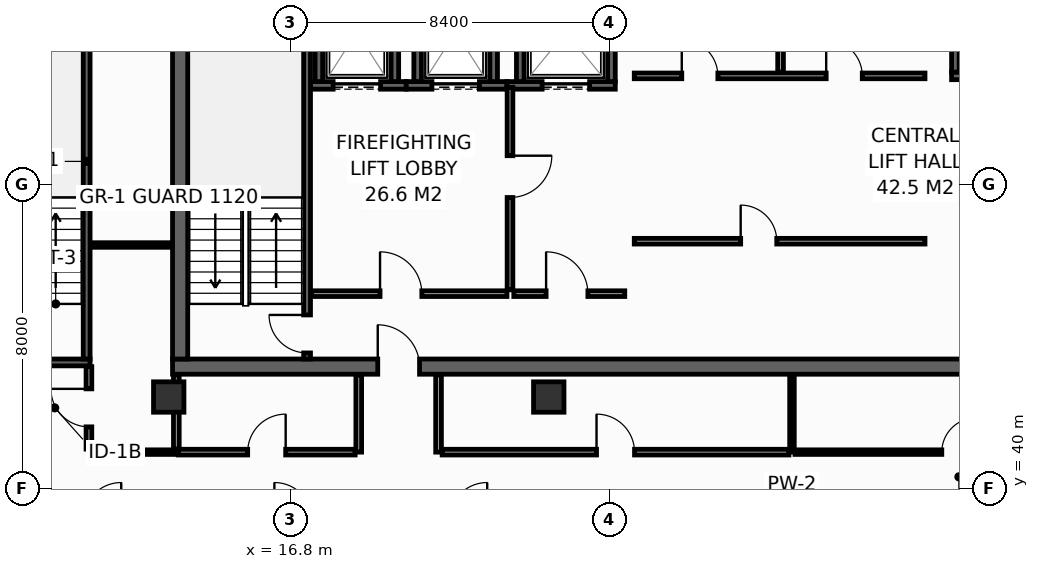
"""IFC4 building model, lengths in metres.
Left out: names, types, materials, properties, quantities, classifications, styles, units other than length and angle.
Written with IfcOpenShell. Run it as: python <this file> out.ifc"""

import sys

from ifc_helpers import new_model, si_unit, direction, frame, frame_2d, origin, origin_2d, place, context, subcontext, project, spatial, rectangle, hollow_rectangle, extrude, element, fill, save


model = new_model("IFC4")
c1 = context("Model", 3, precision=1e-05, world=origin(), true_north=direction((0.0, 1.0)))
c2 = subcontext(c1, "Body", "Model", "MODEL_VIEW")
j1 = project(units=[si_unit("LENGTHUNIT", "METRE"), si_unit("PLANEANGLEUNIT", "RADIAN")], contexts=[c1])
p1 = place(None, origin())
s1 = spatial("IfcSite", under=j1, at=p1, CompositionType="ELEMENT")
p2 = place(p1, origin())
s2 = spatial("IfcBuilding", under=s1, at=p2, CompositionType="ELEMENT")
p3 = place(p2, frame((0.0, 0.0, 230.6)))
s3 = spatial("IfcBuildingStorey", under=s2, at=p3, CompositionType="ELEMENT", Elevation=230.6)
p4 = place(p3, frame((13.7, 43.2, 0.0), z_axis=(0.0, 0.0, 1.0), x_axis=(1.0, 0.0, 0.0)))
e1 = element("IfcWall", 1, at=p4, inside=s3, PredefinedType="SHEAR", context=c2, shape_type="SweptSolid", body=[
    extrude(rectangle(XDim=32.5, YDim=0.4, at=frame_2d((16.25, 0.0))), origin(), (0.0, 0.0, 1.0), 3.55),
])
p5 = place(p4, frame((5.4, 0.0, 0.0)))
e2 = element("IfcOpeningElement", 2, at=p5, cuts=e1, PredefinedType="OPENING", context=c2, shape_type="SweptSolid", body=[
    extrude(rectangle(XDim=1.1, YDim=2.15, at=frame_2d((0.55, 1.075))), frame((0.0, 0.21, 0.0), z_axis=(0.0, -1.0, 0.0), x_axis=(1.0, 0.0, 0.0)), (0.0, 0.0, 1.0), 0.42),
])
p6 = place(p4, frame((25.6, 0.0, 0.0)))
e3 = element("IfcOpeningElement", 3, at=p6, cuts=e1, PredefinedType="OPENING", context=c2, shape_type="SweptSolid", body=[
    extrude(rectangle(XDim=1.1, YDim=2.15, at=frame_2d((0.55, 1.075))), frame((0.0, 0.21, 0.0), z_axis=(0.0, -1.0, 0.0), x_axis=(1.0, 0.0, 0.0)), (0.0, 0.0, 1.0), 0.42),
])
p7 = place(p3, frame((13.9, 43.4, 0.0), z_axis=(0.0, 0.0, 1.0), x_axis=(0.0, 1.0, 0.0)))
e4 = element("IfcWall", 4, at=p7, inside=s3, PredefinedType="SHEAR", context=c2, shape_type="SweptSolid", body=[
    extrude(rectangle(XDim=10.4, YDim=0.4, at=frame_2d((5.2, 0.0))), origin(), (0.0, 0.0, 1.0), 3.55),
])
for number, where, z_axis, x_axis in (
    (5, (13.6, 42.4, 0.0), (0.0, 0.0, 1.0), (1.0, 0.0, 0.0)),
    (6, (23.6, 42.4, 0.0), (0.0, 0.0, 1.0), (1.0, 0.0, 0.0)),
):
    element("IfcColumn", number, at=place(p3, frame(where, z_axis=z_axis, x_axis=x_axis)), inside=s3, PredefinedType="COLUMN", context=c2, shape_type="SweptSolid", body=[
        extrude(hollow_rectangle(XDim=0.8, YDim=0.8, WallThickness=0.036, at=origin_2d()), origin(), (0.0, 0.0, 1.0), 3.8),
    ])
p8 = place(p3, frame((17.33, 50.6, 0.0), z_axis=(0.0, 0.0, 1.0), x_axis=(1.0, 0.0, 0.0)))
e7 = element("IfcWall", 7, at=p8, inside=s3, PredefinedType="SHEAR", context=c2, shape_type="SweptSolid", body=[
    extrude(rectangle(XDim=2.52, YDim=0.2, at=frame_2d((1.26, 0.0))), origin(), (0.0, 0.0, 1.0), 3.55),
])
p9 = place(p8, frame((0.595, 0.0, 0.0)))
e8 = element("IfcOpeningElement", 8, at=p9, cuts=e7, PredefinedType="OPENING", context=c2, shape_type="SweptSolid", body=[
    extrude(rectangle(XDim=1.25, YDim=2.3, at=frame_2d((0.625, 1.15))), frame((0.0, 0.11, 0.0), z_axis=(0.0, -1.0, 0.0), x_axis=(1.0, 0.0, 0.0)), (0.0, 0.0, 1.0), 0.22),
])
for number, where, z_axis, x_axis in (
    (9, (17.55, 50.7, 0.0), (0.0, 0.0, 1.0), (0.0, 1.0, 0.0)),
    (10, (19.55, 50.7, 0.0), (0.0, 0.0, 1.0), (0.0, 1.0, 0.0)),
):
    element("IfcWall", number, at=place(p3, frame(where, z_axis=z_axis, x_axis=x_axis)), inside=s3, PredefinedType="SHEAR", context=c2, shape_type="SweptSolid", body=[
        extrude(rectangle(XDim=2.6, YDim=0.2, at=frame_2d((1.3, 0.0))), origin(), (0.0, 0.0, 1.0), 3.55),
    ])
p10 = place(p3, frame((19.85, 50.6, 0.0), z_axis=(0.0, 0.0, 1.0), x_axis=(1.0, 0.0, 0.0)))
e11 = element("IfcWall", 11, at=p10, inside=s3, PredefinedType="SHEAR", context=c2, shape_type="SweptSolid", body=[
    extrude(rectangle(XDim=2.65, YDim=0.2, at=frame_2d((1.325, 0.0))), origin(), (0.0, 0.0, 1.0), 3.55),
])
p11 = place(p10, frame((0.675, 0.0, 0.0)))
e12 = element("IfcOpeningElement", 12, at=p11, cuts=e11, PredefinedType="OPENING", context=c2, shape_type="SweptSolid", body=[
    extrude(rectangle(XDim=1.25, YDim=2.3, at=frame_2d((0.625, 1.15))), frame((0.0, 0.11, 0.0), z_axis=(0.0, -1.0, 0.0), x_axis=(1.0, 0.0, 0.0)), (0.0, 0.0, 1.0), 0.22),
])
for number, where, z_axis, x_axis in (
    (13, (20.15, 50.7, 0.0), (0.0, 0.0, 1.0), (0.0, 1.0, 0.0)),
    (14, (22.15, 50.7, 0.0), (0.0, 0.0, 1.0), (0.0, 1.0, 0.0)),
):
    element("IfcWall", number, at=place(p3, frame(where, z_axis=z_axis, x_axis=x_axis)), inside=s3, PredefinedType="SHEAR", context=c2, shape_type="SweptSolid", body=[
        extrude(rectangle(XDim=2.6, YDim=0.2, at=frame_2d((1.3, 0.0))), origin(), (0.0, 0.0, 1.0), 3.55),
    ])
p12 = place(p3, frame((22.5, 50.6, 0.0), z_axis=(0.0, 0.0, 1.0), x_axis=(1.0, 0.0, 0.0)))
e15 = element("IfcWall", 15, at=p12, inside=s3, PredefinedType="SHEAR", context=c2, shape_type="SweptSolid", body=[
    extrude(rectangle(XDim=2.85, YDim=0.2, at=frame_2d((1.425, 0.0))), origin(), (0.0, 0.0, 1.0), 3.55),
])
p13 = place(p12, frame((0.925, 0.0, 0.0)))
e16 = element("IfcOpeningElement", 16, at=p13, cuts=e15, PredefinedType="OPENING", context=c2, shape_type="SweptSolid", body=[
    extrude(rectangle(XDim=1.25, YDim=2.3, at=frame_2d((0.625, 1.15))), frame((0.0, 0.11, 0.0), z_axis=(0.0, -1.0, 0.0), x_axis=(1.0, 0.0, 0.0)), (0.0, 0.0, 1.0), 0.22),
])
for number, where, z_axis, x_axis in (
    (17, (22.85, 50.7, 0.0), (0.0, 0.0, 1.0), (0.0, 1.0, 0.0)),
    (18, (25.25, 50.7, 0.0), (0.0, 0.0, 1.0), (0.0, 1.0, 0.0)),
):
    element("IfcWall", number, at=place(p3, frame(where, z_axis=z_axis, x_axis=x_axis)), inside=s3, PredefinedType="SHEAR", context=c2, shape_type="SweptSolid", body=[
        extrude(rectangle(XDim=2.6, YDim=0.2, at=frame_2d((1.3, 0.0))), origin(), (0.0, 0.0, 1.0), 3.55),
    ])
p14 = place(p3, frame((34.2, 50.85, 0.0), z_axis=(0.0, 0.0, 1.0), x_axis=(1.0, 0.0, 0.0)))
e19 = element("IfcWall", 19, at=p14, inside=s3, PredefinedType="SHEAR", context=c2, shape_type="SweptSolid", body=[
    extrude(rectangle(XDim=2.575, YDim=0.2, at=frame_2d((1.288, 0.0))), origin(), (0.0, 0.0, 1.0), 3.55),
])
p15 = place(p14, frame((0.65, 0.0, 0.0)))
e20 = element("IfcOpeningElement", 20, at=p15, cuts=e19, PredefinedType="OPENING", context=c2, shape_type="SweptSolid", body=[
    extrude(rectangle(XDim=1.1, YDim=2.2, at=frame_2d((0.55, 1.1))), frame((0.0, 0.11, 0.0), z_axis=(0.0, -1.0, 0.0), x_axis=(1.0, 0.0, 0.0)), (0.0, 0.0, 1.0), 0.22),
])
p16 = place(p3, frame((34.3, 50.95, 0.0), z_axis=(0.0, 0.0, 1.0), x_axis=(0.0, 1.0, 0.0)))
e21 = element("IfcWall", 21, at=p16, inside=s3, PredefinedType="SHEAR", context=c2, shape_type="SweptSolid", body=[
    extrude(rectangle(XDim=2.3, YDim=0.2, at=frame_2d((1.15, 0.0))), origin(), (0.0, 0.0, 1.0), 3.55),
])
p17 = place(p3, frame((17.24, 43.4, 0.0), z_axis=(0.0, 0.0, 1.0), x_axis=(0.0, 1.0, 0.0)))
e22 = element("IfcWall", 22, at=p17, inside=s3, PredefinedType="SHEAR", context=c2, shape_type="SweptSolid", body=[
    extrude(rectangle(XDim=10.4, YDim=0.18, at=frame_2d((5.2, 0.0))), origin(), (0.0, 0.0, 1.0), 3.55),
])
p18 = place(p17, frame((0.16, 0.0, 0.0)))
e23 = element("IfcOpeningElement", 23, at=p18, cuts=e22, PredefinedType="OPENING", context=c2, shape_type="SweptSolid", body=[
    extrude(rectangle(XDim=1.0, YDim=2.15, at=frame_2d((0.5, 1.075))), frame((0.0, 0.1, 0.0), z_axis=(0.0, -1.0, 0.0), x_axis=(1.0, 0.0, 0.0)), (0.0, 0.0, 1.0), 0.2),
])
p19 = place(p3, frame((8.12, 43.31, 0.0), z_axis=(0.0, 0.0, 1.0), x_axis=(1.0, 0.0, 0.0)))
e24 = element("IfcWall", 24, at=p19, inside=s3, PredefinedType="SHEAR", context=c2, shape_type="SweptSolid", body=[
    extrude(rectangle(XDim=3.41, YDim=0.18, at=frame_2d((1.705, 0.0))), origin(), (0.0, 0.0, 1.0), 3.55),
])
p20 = place(p19, frame((1.15, 0.0, 0.0)))
e25 = element("IfcOpeningElement", 25, at=p20, cuts=e24, PredefinedType="OPENING", context=c2, shape_type="SweptSolid", body=[
    extrude(rectangle(XDim=1.1, YDim=2.15, at=frame_2d((0.55, 1.075))), frame((0.0, 0.1, 0.0), z_axis=(0.0, -1.0, 0.0), x_axis=(1.0, 0.0, 0.0)), (0.0, 0.0, 1.0), 0.2),
])
p21 = place(p3, frame((11.44, 43.4, 0.0), z_axis=(0.0, 0.0, 1.0), x_axis=(0.0, 1.0, 0.0)))
e26 = element("IfcWall", 26, at=p21, inside=s3, PredefinedType="SHEAR", context=c2, shape_type="SweptSolid", body=[
    extrude(rectangle(XDim=10.4, YDim=0.18, at=frame_2d((5.2, 0.0))), origin(), (0.0, 0.0, 1.0), 3.55),
])
p22 = place(p3, frame((17.36, 45.12, 0.0), z_axis=(0.0, 0.0, 1.0), x_axis=(1.0, 0.0, 0.0)))
e27 = element("IfcWall", 27, at=p22, inside=s3, PredefinedType="PARTITIONING", context=c2, shape_type="SweptSolid", body=[
    extrude(rectangle(XDim=5.14, YDim=0.15, at=frame_2d((2.57, 0.0))), origin(), (0.0, 0.0, 1.0), 3.55),
])
p23 = place(p22, frame((1.8, 0.0, 0.0)))
e28 = element("IfcOpeningElement", 28, at=p23, cuts=e27, PredefinedType="OPENING", context=c2, shape_type="SweptSolid", body=[
    extrude(rectangle(XDim=1.1, YDim=2.15, at=frame_2d((0.55, 1.075))), frame((0.0, 0.085, 0.0), z_axis=(0.0, -1.0, 0.0), x_axis=(1.0, 0.0, 0.0)), (0.0, 0.0, 1.0), 0.17),
])
p24 = place(p3, frame((22.58, 50.55, 0.0), z_axis=(0.0, 0.0, 1.0), x_axis=(0.0, -1.0, 0.0)))
e29 = element("IfcWall", 29, at=p24, inside=s3, PredefinedType="PARTITIONING", context=c2, shape_type="SweptSolid", body=[
    extrude(rectangle(XDim=5.33, YDim=0.15, at=frame_2d((2.665, 0.0))), origin(), (0.0, 0.0, 1.0), 3.55),
])
p25 = place(p24, frame((1.8, 0.0, 0.0)))
e30 = element("IfcOpeningElement", 30, at=p25, cuts=e29, PredefinedType="OPENING", context=c2, shape_type="SweptSolid", body=[
    extrude(rectangle(XDim=1.1, YDim=2.15, at=frame_2d((0.55, 1.075))), frame((0.0, 0.085, 0.0), z_axis=(0.0, -1.0, 0.0), x_axis=(1.0, 0.0, 0.0)), (0.0, 0.0, 1.0), 0.17),
])
p26 = place(p3, frame((22.68, 45.12, 0.0), z_axis=(0.0, 0.0, 1.0), x_axis=(1.0, 0.0, 0.0)))
e31 = element("IfcWall", 31, at=p26, inside=s3, PredefinedType="PARTITIONING", context=c2, shape_type="SweptSolid", body=[
    extrude(rectangle(XDim=2.92, YDim=0.15, at=frame_2d((1.46, 0.0))), origin(), (0.0, 0.0, 1.0), 3.55),
])
p27 = place(p26, frame((0.85, 0.0, 0.0)))
e32 = element("IfcOpeningElement", 32, at=p27, cuts=e31, PredefinedType="OPENING", context=c2, shape_type="SweptSolid", body=[
    extrude(rectangle(XDim=1.1, YDim=2.15, at=frame_2d((0.55, 1.075))), frame((0.0, 0.085, 0.0), z_axis=(0.0, -1.0, 0.0), x_axis=(1.0, 0.0, 0.0)), (0.0, 0.0, 1.0), 0.17),
])
p28 = place(p3, frame((25.85, 50.85, 0.0), z_axis=(0.0, 0.0, 1.0), x_axis=(1.0, 0.0, 0.0)))
e33 = element("IfcWall", 33, at=p28, inside=s3, PredefinedType="PARTITIONING", context=c2, shape_type="SweptSolid", body=[
    extrude(rectangle(XDim=7.65, YDim=0.15, at=frame_2d((3.825, 0.0))), origin(), (0.0, 0.0, 1.0), 3.55),
])
p29 = place(p28, frame((1.25, 0.0, 0.0)))
e34 = element("IfcOpeningElement", 34, at=p29, cuts=e33, PredefinedType="OPENING", context=c2, shape_type="SweptSolid", body=[
    extrude(rectangle(XDim=0.95, YDim=2.15, at=frame_2d((0.475, 1.075))), frame((0.0, 0.085, 0.0), z_axis=(0.0, -1.0, 0.0), x_axis=(1.0, 0.0, 0.0)), (0.0, 0.0, 1.0), 0.17),
])
p30 = place(p28, frame((5.05, 0.0, 0.0)))
e35 = element("IfcOpeningElement", 35, at=p30, cuts=e33, PredefinedType="OPENING", context=c2, shape_type="SweptSolid", body=[
    extrude(rectangle(XDim=0.95, YDim=2.15, at=frame_2d((0.475, 1.075))), frame((0.0, 0.085, 0.0), z_axis=(0.0, -1.0, 0.0), x_axis=(1.0, 0.0, 0.0)), (0.0, 0.0, 1.0), 0.17),
])
p31 = place(p3, frame((29.7, 50.95, 0.0), z_axis=(0.0, 0.0, 1.0), x_axis=(0.0, 1.0, 0.0)))
e36 = element("IfcWall", 36, at=p31, inside=s3, PredefinedType="PARTITIONING", context=c2, shape_type="SweptSolid", body=[
    extrude(rectangle(XDim=2.7, YDim=0.15, at=frame_2d((1.35, 0.0))), origin(), (0.0, 0.0, 1.0), 3.55),
])
p32 = place(p3, frame((25.85, 46.5, 0.0), z_axis=(0.0, 0.0, 1.0), x_axis=(1.0, 0.0, 0.0)))
e37 = element("IfcWall", 37, at=p32, inside=s3, PredefinedType="PARTITIONING", context=c2, shape_type="SweptSolid", body=[
    extrude(rectangle(XDim=7.65, YDim=0.15, at=frame_2d((3.825, 0.0))), origin(), (0.0, 0.0, 1.0), 3.55),
])
p33 = place(p32, frame((2.8, 0.0, 0.0)))
e38 = element("IfcOpeningElement", 38, at=p33, cuts=e37, PredefinedType="OPENING", context=c2, shape_type="SweptSolid", body=[
    extrude(rectangle(XDim=0.95, YDim=2.15, at=frame_2d((0.475, 1.075))), frame((0.0, 0.085, 0.0), z_axis=(0.0, -1.0, 0.0), x_axis=(1.0, 0.0, 0.0)), (0.0, 0.0, 1.0), 0.17),
])
p34 = place(p3, frame((11.5, 40.95, 0.0), z_axis=(0.0, 0.0, 1.0), x_axis=(1.0, 0.0, 0.0)))
e39 = element("IfcWall", 39, at=p34, inside=s3, PredefinedType="PARTITIONING", context=c2, shape_type="SweptSolid", body=[
    extrude(rectangle(XDim=2.35, YDim=0.12, at=frame_2d((1.175, 0.0))), origin(), (0.0, 0.0, 1.0), 3.55),
])
p35 = place(p3, frame((11.55, 46.4, 0.0), z_axis=(0.0, 0.0, 1.0), x_axis=(1.0, 0.0, 0.0)))
e40 = element("IfcWall", 40, at=p35, inside=s3, PredefinedType="PARTITIONING", context=c2, shape_type="SweptSolid", body=[
    extrude(rectangle(XDim=2.13, YDim=0.12, at=frame_2d((1.065, 0.0))), origin(), (0.0, 0.0, 1.0), 3.55),
])
p36 = place(p3, frame((11.5, 41.03, 0.0), z_axis=(0.0, 0.0, 1.0), x_axis=(0.0, 1.0, 0.0)))
e41 = element("IfcWall", 41, at=p36, inside=s3, PredefinedType="PARTITIONING", context=c2, shape_type="SweptSolid", body=[
    extrude(rectangle(XDim=2.17, YDim=0.15, at=frame_2d((1.085, 0.0))), origin(), (0.0, 0.0, 1.0), 2.947),
])
p37 = place(p36, frame((0.585, 0.0, 0.0)))
e42 = element("IfcOpeningElement", 42, at=p37, cuts=e41, PredefinedType="OPENING", context=c2, shape_type="SweptSolid", body=[
    extrude(rectangle(XDim=1.0, YDim=2.15, at=frame_2d((0.5, 1.075))), frame((0.0, 0.085, 0.0), z_axis=(0.0, -1.0, 0.0), x_axis=(1.0, 0.0, 0.0)), (0.0, 0.0, 1.0), 0.17),
])
p38 = place(p3, frame((13.8, 41.03, 0.0), z_axis=(0.0, 0.0, 1.0), x_axis=(0.0, 1.0, 0.0)))
e43 = element("IfcWall", 43, at=p38, inside=s3, PredefinedType="PARTITIONING", context=c2, shape_type="SweptSolid", body=[
    extrude(rectangle(XDim=1.95, YDim=0.15, at=frame_2d((0.975, 0.0))), origin(), (0.0, 0.0, 1.0), 3.55),
])
for number, where, z_axis, x_axis in (
    (44, (18.6, 40.95, 0.0), (0.0, 0.0, 1.0), (0.0, 1.0, 0.0)),
    (45, (20.7, 40.95, 0.0), (0.0, 0.0, 1.0), (0.0, 1.0, 0.0)),
):
    element("IfcWall", number, at=place(p3, frame(where, z_axis=z_axis, x_axis=x_axis)), inside=s3, PredefinedType="PARTITIONING", context=c2, shape_type="SweptSolid", body=[
        extrude(rectangle(XDim=2.03, YDim=0.15, at=frame_2d((1.015, 0.0))), origin(), (0.0, 0.0, 1.0), 3.55),
    ])
p39 = place(p3, frame((13.85, 40.95, 0.0), z_axis=(0.0, 0.0, 1.0), x_axis=(1.0, 0.0, 0.0)))
e46 = element("IfcWall", 46, at=p39, inside=s3, PredefinedType="PARTITIONING", context=c2, shape_type="SweptSolid", body=[
    extrude(rectangle(XDim=4.655, YDim=0.15, at=frame_2d((2.327, 0.0))), origin(), (0.0, 0.0, 1.0), 3.55),
])
p40 = place(p39, frame((1.827, 0.0, 0.0)))
e47 = element("IfcOpeningElement", 47, at=p40, cuts=e46, PredefinedType="OPENING", context=c2, shape_type="SweptSolid", body=[
    extrude(rectangle(XDim=1.0, YDim=2.15, at=frame_2d((0.5, 1.075))), frame((0.0, 0.085, 0.0), z_axis=(0.0, -1.0, 0.0), x_axis=(1.0, 0.0, 0.0)), (0.0, 0.0, 1.0), 0.17),
])
p41 = place(p3, frame((30.0, 40.95, 0.0), z_axis=(0.0, 0.0, 1.0), x_axis=(0.0, 1.0, 0.0)))
e48 = element("IfcWall", 48, at=p41, inside=s3, PredefinedType="PARTITIONING", context=c2, shape_type="SweptSolid", body=[
    extrude(rectangle(XDim=2.03, YDim=0.12, at=frame_2d((1.015, 0.0))), origin(), (0.0, 0.0, 1.0), 2.947),
])
p42 = place(p3, frame((20.795, 40.95, 0.0), z_axis=(0.0, 0.0, 1.0), x_axis=(1.0, 0.0, 0.0)))
e49 = element("IfcWall", 49, at=p42, inside=s3, PredefinedType="PARTITIONING", context=c2, shape_type="SweptSolid", body=[
    extrude(rectangle(XDim=9.125, YDim=0.15, at=frame_2d((4.562, 0.0))), origin(), (0.0, 0.0, 1.0), 2.947),
])
p43 = place(p42, frame((4.062, 0.0, 0.0)))
e50 = element("IfcOpeningElement", 50, at=p43, cuts=e49, PredefinedType="OPENING", context=c2, shape_type="SweptSolid", body=[
    extrude(rectangle(XDim=1.0, YDim=2.15, at=frame_2d((0.5, 1.075))), frame((0.0, 0.085, 0.0), z_axis=(0.0, -1.0, 0.0), x_axis=(1.0, 0.0, 0.0)), (0.0, 0.0, 1.0), 0.17),
])
p44 = place(p3, frame((30.08, 40.95, 0.0), z_axis=(0.0, 0.0, 1.0), x_axis=(1.0, 0.0, 0.0)))
e51 = element("IfcWall", 51, at=p44, inside=s3, PredefinedType="PARTITIONING", context=c2, shape_type="SweptSolid", body=[
    extrude(rectangle(XDim=8.625, YDim=0.12, at=frame_2d((4.312, 0.0))), origin(), (0.0, 0.0, 1.0), 2.947),
])
p45 = place(p44, frame((3.862, 0.0, 0.0)))
e52 = element("IfcOpeningElement", 52, at=p45, cuts=e51, PredefinedType="OPENING", context=c2, shape_type="SweptSolid", body=[
    extrude(rectangle(XDim=0.9, YDim=2.1, at=frame_2d((0.45, 1.05))), frame((0.0, 0.07, 0.0), z_axis=(0.0, -1.0, 0.0), x_axis=(1.0, 0.0, 0.0)), (0.0, 0.0, 1.0), 0.14),
])
p46 = place(p9, origin())
e53 = element("IfcDoor", 53, at=p46, inside=s3, OperationType="SLIDING_TO_LEFT", PredefinedType="DOOR", context=c2, shape_type="SweptSolid", body=[
    extrude(rectangle(XDim=1.25, YDim=2.3, at=frame_2d((0.625, 1.15))), frame((0.0, 0.025, 0.0), z_axis=(0.0, -1.0, 0.0), x_axis=(1.0, 0.0, 0.0)), (0.0, 0.0, 1.0), 0.05),
])
fill(e8, e53)
p47 = place(p11, origin())
e54 = element("IfcDoor", 54, at=p47, inside=s3, OperationType="SLIDING_TO_LEFT", PredefinedType="DOOR", context=c2, shape_type="SweptSolid", body=[
    extrude(rectangle(XDim=1.25, YDim=2.3, at=frame_2d((0.625, 1.15))), frame((0.0, 0.025, 0.0), z_axis=(0.0, -1.0, 0.0), x_axis=(1.0, 0.0, 0.0)), (0.0, 0.0, 1.0), 0.05),
])
fill(e12, e54)
p48 = place(p13, origin())
e55 = element("IfcDoor", 55, at=p48, inside=s3, OperationType="SLIDING_TO_LEFT", PredefinedType="DOOR", context=c2, shape_type="SweptSolid", body=[
    extrude(rectangle(XDim=1.25, YDim=2.3, at=frame_2d((0.625, 1.15))), frame((0.0, 0.025, 0.0), z_axis=(0.0, -1.0, 0.0), x_axis=(1.0, 0.0, 0.0)), (0.0, 0.0, 1.0), 0.05),
])
fill(e16, e55)
p49 = place(p18, origin())
e56 = element("IfcDoor", 56, at=p49, inside=s3, OperationType="SINGLE_SWING_RIGHT", PredefinedType="DOOR", context=c2, shape_type="SweptSolid", body=[
    extrude(rectangle(XDim=1.0, YDim=2.15, at=frame_2d((0.5, 1.075))), frame((0.0, 0.025, 0.0), z_axis=(0.0, -1.0, 0.0), x_axis=(1.0, 0.0, 0.0)), (0.0, 0.0, 1.0), 0.05),
])
fill(e23, e56)
p50 = place(p23, origin())
e57 = element("IfcDoor", 57, at=p50, inside=s3, OperationType="SINGLE_SWING_LEFT", PredefinedType="DOOR", context=c2, shape_type="SweptSolid", body=[
    extrude(rectangle(XDim=1.1, YDim=2.15, at=frame_2d((0.55, 1.075))), frame((0.0, 0.025, 0.0), z_axis=(0.0, -1.0, 0.0), x_axis=(1.0, 0.0, 0.0)), (0.0, 0.0, 1.0), 0.05),
])
fill(e28, e57)
p51 = place(p25, origin())
e58 = element("IfcDoor", 58, at=p51, inside=s3, OperationType="SINGLE_SWING_LEFT", PredefinedType="DOOR", context=c2, shape_type="SweptSolid", body=[
    extrude(rectangle(XDim=1.1, YDim=2.15, at=frame_2d((0.55, 1.075))), frame((0.0, 0.025, 0.0), z_axis=(0.0, -1.0, 0.0), x_axis=(1.0, 0.0, 0.0)), (0.0, 0.0, 1.0), 0.05),
])
fill(e30, e58)
p52 = place(p27, origin())
e59 = element("IfcDoor", 59, at=p52, inside=s3, OperationType="SINGLE_SWING_LEFT", PredefinedType="DOOR", context=c2, shape_type="SweptSolid", body=[
    extrude(rectangle(XDim=1.1, YDim=2.15, at=frame_2d((0.55, 1.075))), frame((0.0, 0.025, 0.0), z_axis=(0.0, -1.0, 0.0), x_axis=(1.0, 0.0, 0.0)), (0.0, 0.0, 1.0), 0.05),
])
fill(e32, e59)
p53 = place(p5, origin())
e60 = element("IfcDoor", 60, at=p53, inside=s3, OperationType="SINGLE_SWING_LEFT", PredefinedType="DOOR", context=c2, shape_type="SweptSolid", body=[
    extrude(rectangle(XDim=1.1, YDim=2.15, at=frame_2d((0.55, 1.075))), frame((0.0, 0.025, 0.0), z_axis=(0.0, -1.0, 0.0), x_axis=(1.0, 0.0, 0.0)), (0.0, 0.0, 1.0), 0.05),
])
fill(e2, e60)
p54 = place(p29, origin())
e61 = element("IfcDoor", 61, at=p54, inside=s3, OperationType="SINGLE_SWING_LEFT", PredefinedType="DOOR", context=c2, shape_type="SweptSolid", body=[
    extrude(rectangle(XDim=0.95, YDim=2.15, at=frame_2d((0.475, 1.075))), frame((0.0, 0.025, 0.0), z_axis=(0.0, -1.0, 0.0), x_axis=(1.0, 0.0, 0.0)), (0.0, 0.0, 1.0), 0.05),
])
fill(e34, e61)
p55 = place(p30, origin())
e62 = element("IfcDoor", 62, at=p55, inside=s3, OperationType="SINGLE_SWING_LEFT", PredefinedType="DOOR", context=c2, shape_type="SweptSolid", body=[
    extrude(rectangle(XDim=0.95, YDim=2.15, at=frame_2d((0.475, 1.075))), frame((0.0, 0.025, 0.0), z_axis=(0.0, -1.0, 0.0), x_axis=(1.0, 0.0, 0.0)), (0.0, 0.0, 1.0), 0.05),
])
fill(e35, e62)
p56 = place(p33, origin())
e63 = element("IfcDoor", 63, at=p56, inside=s3, OperationType="SINGLE_SWING_LEFT", PredefinedType="DOOR", context=c2, shape_type="SweptSolid", body=[
    extrude(rectangle(XDim=0.95, YDim=2.15, at=frame_2d((0.475, 1.075))), frame((0.0, 0.025, 0.0), z_axis=(0.0, -1.0, 0.0), x_axis=(1.0, 0.0, 0.0)), (0.0, 0.0, 1.0), 0.05),
])
fill(e38, e63)
p57 = place(p37, origin())
e64 = element("IfcDoor", 64, at=p57, inside=s3, OperationType="SINGLE_SWING_RIGHT", PredefinedType="DOOR", context=c2, shape_type="SweptSolid", body=[
    extrude(rectangle(XDim=1.0, YDim=2.15, at=frame_2d((0.5, 1.075))), frame((0.0, 0.025, 0.0), z_axis=(0.0, -1.0, 0.0), x_axis=(1.0, 0.0, 0.0)), (0.0, 0.0, 1.0), 0.05),
])
fill(e42, e64)
p58 = place(p40, origin())
e65 = element("IfcDoor", 65, at=p58, inside=s3, OperationType="SINGLE_SWING_RIGHT", PredefinedType="DOOR", context=c2, shape_type="SweptSolid", body=[
    extrude(rectangle(XDim=1.0, YDim=2.15, at=frame_2d((0.5, 1.075))), frame((0.0, 0.025, 0.0), z_axis=(0.0, -1.0, 0.0), x_axis=(1.0, 0.0, 0.0)), (0.0, 0.0, 1.0), 0.05),
])
fill(e47, e65)
p59 = place(p43, origin())
e66 = element("IfcDoor", 66, at=p59, inside=s3, OperationType="SINGLE_SWING_LEFT", PredefinedType="DOOR", context=c2, shape_type="SweptSolid", body=[
    extrude(rectangle(XDim=1.0, YDim=2.15, at=frame_2d((0.5, 1.075))), frame((0.0, 0.025, 0.0), z_axis=(0.0, -1.0, 0.0), x_axis=(1.0, 0.0, 0.0)), (0.0, 0.0, 1.0), 0.05),
])
fill(e50, e66)
p60 = place(p45, origin())
e67 = element("IfcDoor", 67, at=p60, inside=s3, OperationType="SINGLE_SWING_RIGHT", PredefinedType="DOOR", context=c2, shape_type="SweptSolid", body=[
    extrude(rectangle(XDim=0.9, YDim=2.1, at=frame_2d((0.45, 1.05))), frame((0.0, 0.025, 0.0), z_axis=(0.0, -1.0, 0.0), x_axis=(1.0, 0.0, 0.0)), (0.0, 0.0, 1.0), 0.05),
])
fill(e52, e67)
save(model, sys.argv[1])
